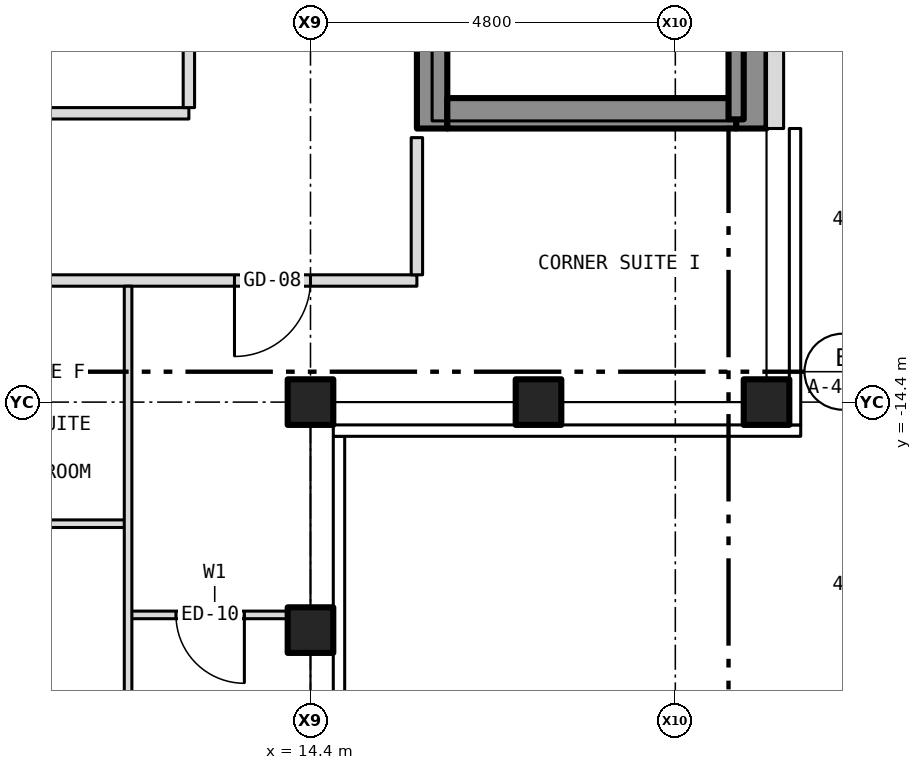
"""IFC4 building model, lengths in metres.
Left out: names, types, materials, properties, quantities, classifications, styles, units other than length and angle.
Written with IfcOpenShell. Run it as: python <this file> out.ifc"""

import sys

from ifc_helpers import new_model, si_unit, direction, frame, frame_2d, origin, origin_2d, place, context, subcontext, project, spatial, rectangle, hollow_rectangle, extrude, element, fill, save


model = new_model("IFC4")
c1 = context("Model", 3, precision=1e-05, world=origin(), true_north=direction((0.0, 1.0)))
c2 = subcontext(c1, "Body", "Model", "MODEL_VIEW")
j1 = project(units=[si_unit("LENGTHUNIT", "METRE"), si_unit("PLANEANGLEUNIT", "RADIAN")], contexts=[c1])
p1 = place(None, origin())
s1 = spatial("IfcSite", under=j1, at=p1, CompositionType="ELEMENT")
p2 = place(p1, origin())
s2 = spatial("IfcBuilding", under=s1, at=p2, CompositionType="ELEMENT")
p3 = place(p2, frame((0.0, 0.0, 244.5)))
s3 = spatial("IfcBuildingStorey", under=s2, at=p3, CompositionType="ELEMENT", Elevation=244.5)
for number, where, z_axis, x_axis in (
    (1, (20.4, -14.4, -0.15), (0.0, 0.0, 1.0), (1.0, 0.0, 0.0)),
    (2, (14.4, -14.4, -0.15), (0.0, 0.0, 1.0), (1.0, 0.0, 0.0)),
    (3, (14.4, -17.4, -0.15), (0.0, 0.0, 1.0), (1.0, 0.0, 0.0)),
    (4, (17.4, -14.4, -0.15), (0.0, 0.0, 1.0), (1.0, 0.0, 0.0)),
):
    element("IfcColumn", number, at=place(p3, frame(where, z_axis=z_axis, x_axis=x_axis)), inside=s3, PredefinedType="COLUMN", context=c2, shape_type="SweptSolid", body=[
        extrude(hollow_rectangle(XDim=0.6, YDim=0.6, WallThickness=0.03, at=origin_2d()), origin(), (0.0, 0.0, 1.0), 3.5),
    ])
p4 = place(p3, frame((16.0, -10.8, 0.0), z_axis=(0.0, 0.0, 1.0), x_axis=(0.0, 1.0, 0.0)))
e5 = element("IfcWall", 5, at=p4, inside=s3, PredefinedType="SHEAR", context=c2, shape_type="SweptSolid", body=[
    extrude(rectangle(XDim=21.6, YDim=0.4, at=frame_2d((10.8, 0.0))), origin(), (0.0, 0.0, 1.0), 3.25),
])
p5 = place(p4, frame((9.4, 0.0, 0.0)))
e6 = element("IfcOpeningElement", 6, at=p5, cuts=e5, PredefinedType="OPENING", context=c2, shape_type="SweptSolid", body=[
    extrude(rectangle(XDim=1.1, YDim=2.1, at=frame_2d((0.55, 1.05))), frame((0.0, 0.212, 0.0), z_axis=(0.0, -1.0, 0.0), x_axis=(1.0, 0.0, 0.0)), (0.0, 0.0, 1.0), 0.424),
])
p6 = place(p4, frame((11.5, 0.0, 0.0)))
e7 = element("IfcOpeningElement", 7, at=p6, cuts=e5, PredefinedType="OPENING", context=c2, shape_type="SweptSolid", body=[
    extrude(rectangle(XDim=1.1, YDim=2.1, at=frame_2d((0.55, 1.05))), frame((0.0, 0.212, 0.0), z_axis=(0.0, -1.0, 0.0), x_axis=(1.0, 0.0, 0.0)), (0.0, 0.0, 1.0), 0.424),
])
p7 = place(p4, frame((13.6, 0.0, 0.0)))
e8 = element("IfcOpeningElement", 8, at=p7, cuts=e5, PredefinedType="OPENING", context=c2, shape_type="SweptSolid", body=[
    extrude(rectangle(XDim=1.1, YDim=2.1, at=frame_2d((0.55, 1.05))), frame((0.0, 0.212, 0.0), z_axis=(0.0, -1.0, 0.0), x_axis=(1.0, 0.0, 0.0)), (0.0, 0.0, 1.0), 0.424),
])
p8 = place(p4, frame((15.7, 0.0, 0.0)))
e9 = element("IfcOpeningElement", 9, at=p8, cuts=e5, PredefinedType="OPENING", context=c2, shape_type="SweptSolid", body=[
    extrude(rectangle(XDim=1.1, YDim=2.1, at=frame_2d((0.55, 1.05))), frame((0.0, 0.212, 0.0), z_axis=(0.0, -1.0, 0.0), x_axis=(1.0, 0.0, 0.0)), (0.0, 0.0, 1.0), 0.424),
])
p9 = place(p4, frame((17.8, 0.0, 0.0)))
e10 = element("IfcOpeningElement", 10, at=p9, cuts=e5, PredefinedType="OPENING", context=c2, shape_type="SweptSolid", body=[
    extrude(rectangle(XDim=1.1, YDim=2.1, at=frame_2d((0.55, 1.05))), frame((0.0, 0.212, 0.0), z_axis=(0.0, -1.0, 0.0), x_axis=(1.0, 0.0, 0.0)), (0.0, 0.0, 1.0), 0.424),
])
p10 = place(p4, frame((5.642, 0.0, 0.0)))
e11 = element("IfcOpeningElement", 11, at=p10, cuts=e5, PredefinedType="OPENING", context=c2, shape_type="SweptSolid", body=[
    extrude(rectangle(XDim=1.1, YDim=2.1, at=frame_2d((0.55, 1.05))), frame((0.0, 0.212, 0.0), z_axis=(0.0, -1.0, 0.0), x_axis=(1.0, 0.0, 0.0)), (0.0, 0.0, 1.0), 0.424),
])
p11 = place(p4, frame((7.5, 0.0, 0.0)))
e12 = element("IfcOpeningElement", 12, at=p11, cuts=e5, PredefinedType="OPENING", context=c2, shape_type="SweptSolid", body=[
    extrude(rectangle(XDim=1.1, YDim=2.1, at=frame_2d((0.55, 1.05))), frame((0.0, 0.212, 0.0), z_axis=(0.0, -1.0, 0.0), x_axis=(1.0, 0.0, 0.0)), (0.0, 0.0, 1.0), 0.424),
])
p12 = place(p4, frame((20.0, 0.0, 0.0)))
e13 = element("IfcOpeningElement", 13, at=p12, cuts=e5, PredefinedType="OPENING", context=c2, shape_type="SweptSolid", body=[
    extrude(rectangle(XDim=0.9, YDim=2.1, at=frame_2d((0.45, 1.05))), frame((0.0, 0.212, 0.0), z_axis=(0.0, -1.0, 0.0), x_axis=(1.0, 0.0, 0.0)), (0.0, 0.0, 1.0), 0.424),
])
p13 = place(p3, frame((20.2, -10.8, 0.0), z_axis=(0.0, 0.0, 1.0), x_axis=(0.0, 1.0, 0.0)))
e14 = element("IfcWall", 14, at=p13, inside=s3, PredefinedType="SHEAR", context=c2, shape_type="SweptSolid", body=[
    extrude(rectangle(XDim=21.6, YDim=0.4, at=frame_2d((10.8, 0.0))), origin(), (0.0, 0.0, 1.0), 3.25),
])
p14 = place(p3, frame((16.2, -10.6, 0.0), z_axis=(0.0, 0.0, 1.0), x_axis=(1.0, 0.0, 0.0)))
e15 = element("IfcWall", 15, at=p14, inside=s3, PredefinedType="SHEAR", context=c2, shape_type="SweptSolid", body=[
    extrude(rectangle(XDim=3.8, YDim=0.4, at=frame_2d((1.9, 0.0))), origin(), (0.0, 0.0, 1.0), 3.25),
])
p15 = place(p3, frame((20.512, -10.8, 0.0), z_axis=(0.0, 0.0, 1.0), x_axis=(0.0, 1.0, 0.0)))
e16 = element("IfcWall", 16, at=p15, inside=s3, PredefinedType="SOLIDWALL", context=c2, shape_type="SweptSolid", body=[
    extrude(rectangle(XDim=21.6, YDim=0.225, at=frame_2d((10.8, 0.0))), origin(), (0.0, 0.0, 1.0), 3.5),
])
p16 = place(p15, frame((2.95, 0.0, 1.0)))
e17 = element("IfcOpeningElement", 17, at=p16, cuts=e16, PredefinedType="OPENING", context=c2, shape_type="SweptSolid", body=[
    extrude(rectangle(XDim=0.6, YDim=1.5, at=frame_2d((0.3, 0.75))), frame((0.0, 0.125, 0.0), z_axis=(0.0, -1.0, 0.0), x_axis=(1.0, 0.0, 0.0)), (0.0, 0.0, 1.0), 0.249),
])
p17 = place(p3, frame((12.0, -17.2, 0.0), z_axis=(0.0, 0.0, 1.0), x_axis=(1.0, 0.0, 0.0)))
e18 = element("IfcWall", 18, at=p17, inside=s3, PredefinedType="PARTITIONING", context=c2, shape_type="SweptSolid", body=[
    extrude(rectangle(XDim=2.28, YDim=0.1, at=frame_2d((1.14, 0.0))), origin(), (0.0, 0.0, 1.0), 3.35),
])
p18 = place(p17, frame((0.63, 0.0, 0.0)))
e19 = element("IfcOpeningElement", 19, at=p18, cuts=e18, PredefinedType="OPENING", context=c2, shape_type="SweptSolid", body=[
    extrude(rectangle(XDim=0.9, YDim=2.1, at=frame_2d((0.45, 1.05))), frame((0.0, 0.062, 0.0), z_axis=(0.0, -1.0, 0.0), x_axis=(1.0, 0.0, 0.0)), (0.0, 0.0, 1.0), 0.124),
])
p19 = place(p3, frame((9.8, -16.0, 0.0), z_axis=(0.0, 0.0, 1.0), x_axis=(1.0, 0.0, 0.0)))
e20 = element("IfcWall", 20, at=p19, inside=s3, PredefinedType="PARTITIONING", context=c2, shape_type="SweptSolid", body=[
    extrude(rectangle(XDim=2.2, YDim=0.1, at=frame_2d((1.1, 0.0))), origin(), (0.0, 0.0, 1.0), 3.35),
])
p20 = place(p3, frame((-15.8, -12.8, 0.0), z_axis=(0.0, 0.0, 1.0), x_axis=(1.0, 0.0, 0.0)))
e21 = element("IfcWall", 21, at=p20, inside=s3, PredefinedType="PARTITIONING", context=c2, shape_type="SweptSolid", body=[
    extrude(rectangle(XDim=31.6, YDim=0.15, at=frame_2d((15.8, 0.0))), origin(), (0.0, 0.0, 1.0), 3.35),
])
p21 = place(p20, frame((4.6, 0.0, 0.0)))
e22 = element("IfcOpeningElement", 22, at=p21, cuts=e21, PredefinedType="OPENING", context=c2, shape_type="SweptSolid", body=[
    extrude(rectangle(XDim=1.0, YDim=2.1, at=frame_2d((0.5, 1.05))), frame((0.0, 0.087, 0.0), z_axis=(0.0, -1.0, 0.0), x_axis=(1.0, 0.0, 0.0)), (0.0, 0.0, 1.0), 0.174),
])
p22 = place(p20, frame((12.8, 0.0, 0.0)))
e23 = element("IfcOpeningElement", 23, at=p22, cuts=e21, PredefinedType="OPENING", context=c2, shape_type="SweptSolid", body=[
    extrude(rectangle(XDim=1.0, YDim=2.1, at=frame_2d((0.5, 1.05))), frame((0.0, 0.087, 0.0), z_axis=(0.0, -1.0, 0.0), x_axis=(1.0, 0.0, 0.0)), (0.0, 0.0, 1.0), 0.174),
])
p23 = place(p20, frame((18.0, 0.0, 0.0)))
e24 = element("IfcOpeningElement", 24, at=p23, cuts=e21, PredefinedType="OPENING", context=c2, shape_type="SweptSolid", body=[
    extrude(rectangle(XDim=1.0, YDim=2.1, at=frame_2d((0.5, 1.05))), frame((0.0, 0.087, 0.0), z_axis=(0.0, -1.0, 0.0), x_axis=(1.0, 0.0, 0.0)), (0.0, 0.0, 1.0), 0.174),
])
p24 = place(p20, frame((1.4, 0.0, 0.0)))
e25 = element("IfcOpeningElement", 25, at=p24, cuts=e21, PredefinedType="OPENING", context=c2, shape_type="SweptSolid", body=[
    extrude(rectangle(XDim=1.0, YDim=2.1, at=frame_2d((0.5, 1.05))), frame((0.0, 0.087, 0.0), z_axis=(0.0, -1.0, 0.0), x_axis=(1.0, 0.0, 0.0)), (0.0, 0.0, 1.0), 0.174),
])
p25 = place(p20, frame((29.2, 0.0, 0.0)))
e26 = element("IfcOpeningElement", 26, at=p25, cuts=e21, PredefinedType="OPENING", context=c2, shape_type="SweptSolid", body=[
    extrude(rectangle(XDim=1.0, YDim=2.1, at=frame_2d((0.5, 1.05))), frame((0.0, 0.087, 0.0), z_axis=(0.0, -1.0, 0.0), x_axis=(1.0, 0.0, 0.0)), (0.0, 0.0, 1.0), 0.174),
])
p26 = place(p3, frame((9.7, -10.6, 0.0), z_axis=(0.0, 0.0, 1.0), x_axis=(1.0, 0.0, 0.0)))
e27 = element("IfcWall", 27, at=p26, inside=s3, PredefinedType="PARTITIONING", context=c2, shape_type="SweptSolid", body=[
    extrude(rectangle(XDim=3.1, YDim=0.15, at=frame_2d((1.55, 0.0))), origin(), (0.0, 0.0, 1.0), 3.35),
])
p27 = place(p3, frame((12.0, -20.73, 0.0), z_axis=(0.0, 0.0, 1.0), x_axis=(0.0, 1.0, 0.0)))
e28 = element("IfcWall", 28, at=p27, inside=s3, PredefinedType="PARTITIONING", context=c2, shape_type="SweptSolid", body=[
    extrude(rectangle(XDim=7.855, YDim=0.1, at=frame_2d((3.927, 0.0))), origin(), (0.0, 0.0, 1.0), 3.35),
])
p28 = place(p3, frame((12.8, -10.525, 0.0), z_axis=(0.0, 0.0, 1.0), x_axis=(0.0, 1.0, 0.0)))
e29 = element("IfcWall", 29, at=p28, inside=s3, PredefinedType="PARTITIONING", context=c2, shape_type="SweptSolid", body=[
    extrude(rectangle(XDim=8.525, YDim=0.15, at=frame_2d((4.262, 0.0))), origin(), (0.0, 0.0, 1.0), 3.35),
])
p29 = place(p3, frame((15.8, -12.725, 0.0), z_axis=(0.0, 0.0, 1.0), x_axis=(0.0, 1.0, 0.0)))
e30 = element("IfcWall", 30, at=p29, inside=s3, PredefinedType="PARTITIONING", context=c2, shape_type="SweptSolid", body=[
    extrude(rectangle(XDim=1.805, YDim=0.15, at=frame_2d((0.903, 0.0))), origin(), (0.0, 0.0, 1.0), 3.35),
])
p30 = place(p3, frame((20.0, -10.68, 0.0), z_axis=(0.0, 0.0, 1.0), x_axis=(0.0, 1.0, 0.0)))
e31 = element("IfcWall", 31, at=p30, inside=s3, PredefinedType="SHEAR", context=c2, shape_type="SweptSolid", body=[
    extrude(rectangle(XDim=6.98, YDim=0.2, at=frame_2d((3.49, 0.0))), origin(), (0.0, 0.0, 1.0), 3.25),
])
p31 = place(p18, origin())
e32 = element("IfcDoor", 32, at=p31, inside=s3, OperationType="SINGLE_SWING_RIGHT", PredefinedType="DOOR", context=c2, shape_type="SweptSolid", body=[
    extrude(rectangle(XDim=0.9, YDim=2.1, at=frame_2d((0.45, 1.05))), frame((0.0, 0.025, 0.0), z_axis=(0.0, -1.0, 0.0), x_axis=(1.0, 0.0, 0.0)), (0.0, 0.0, 1.0), 0.05),
])
fill(e19, e32)
p32 = place(p25, origin())
e33 = element("IfcDoor", 33, at=p32, inside=s3, OperationType="SINGLE_SWING_LEFT", PredefinedType="DOOR", context=c2, shape_type="SweptSolid", body=[
    extrude(rectangle(XDim=1.0, YDim=2.1, at=frame_2d((0.5, 1.05))), frame((0.0, 0.025, 0.0), z_axis=(0.0, -1.0, 0.0), x_axis=(1.0, 0.0, 0.0)), (0.0, 0.0, 1.0), 0.05),
])
fill(e26, e33)
save(model, sys.argv[1])
